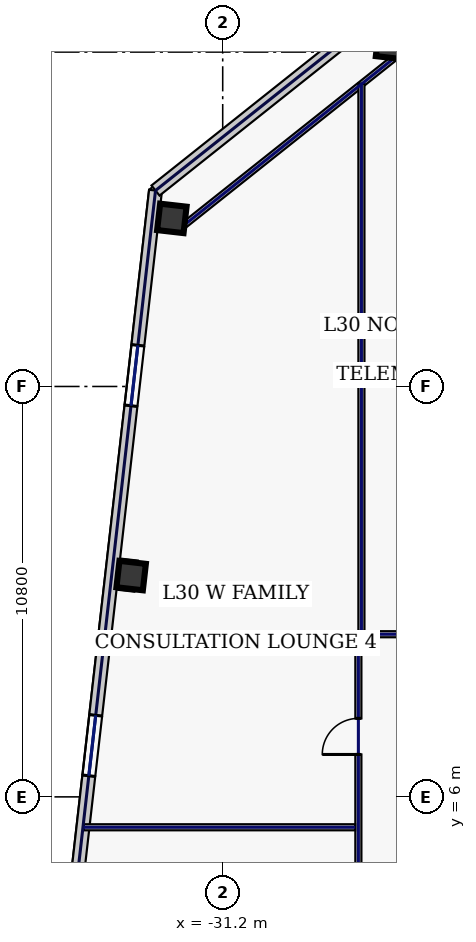
"""IFC4 building model, lengths in metres.
Left out: names, types, materials, properties, quantities, classifications, styles, units other than length and angle.
Written with IfcOpenShell. Run it as: python <this file> out.ifc"""

import sys

from ifc_helpers import new_model, si_unit, direction, frame, frame_2d, origin, origin_2d, place, context, subcontext, project, spatial, rectangle, hollow_rectangle, extrude, element, fill, save


model = new_model("IFC4")
c1 = context("Model", 3, precision=1e-05, world=origin(), true_north=direction((0.0, 1.0)))
c2 = subcontext(c1, "Body", "Model", "MODEL_VIEW")
j1 = project(units=[si_unit("LENGTHUNIT", "METRE"), si_unit("PLANEANGLEUNIT", "RADIAN")], contexts=[c1])
p1 = place(None, origin())
s1 = spatial("IfcSite", under=j1, at=p1, CompositionType="ELEMENT")
p2 = place(p1, origin())
s2 = spatial("IfcBuilding", under=s1, at=p2, CompositionType="ELEMENT")
p3 = place(p2, frame((0.0, 0.0, 133.4)))
s3 = spatial("IfcBuildingStorey", under=s2, at=p3, CompositionType="ELEMENT", Elevation=133.4)
for number, where, z_axis, x_axis in (
    (1, (-26.783, 25.801, 0.0), (0.0, 0.0, 1.0), (0.994, -0.113, 0.0)),
    (2, (-32.538, 21.223, 0.0), (0.0, 0.0, 1.0), (0.994, -0.113, 0.0)),
    (3, (-33.609, 11.824, 0.0), (0.0, 0.0, 1.0), (0.994, -0.113, 0.0)),
):
    element("IfcColumn", number, at=place(p3, frame(where, z_axis=z_axis, x_axis=x_axis)), inside=s3, PredefinedType="COLUMN", context=c2, shape_type="SweptSolid", body=[
        extrude(hollow_rectangle(XDim=0.7, YDim=0.7, WallThickness=0.032, at=origin_2d()), origin(), (0.0, 0.0, 1.0), 3.74),
    ])
p4 = place(p3, frame((-6.314, 23.982, 0.0), z_axis=(0.0, 0.0, 1.0), x_axis=(-0.993571362037, 0.113207546299, 0.0)))
e4 = element("IfcWall", 4, at=p4, inside=s3, PredefinedType="STANDARD", context=c2, shape_type="SweptSolid", body=[
    extrude(rectangle(XDim=21.223, YDim=0.34, at=frame_2d((10.611, 0.0))), origin(), (0.0, 0.0, 1.0), 3.74),
])
p5 = place(p4, frame((17.265, 0.0, 0.22)))
e5 = element("IfcOpeningElement", 5, at=p5, cuts=e4, PredefinedType="OPENING", context=c2, shape_type="SweptSolid", body=[
    extrude(rectangle(XDim=1.6, YDim=1.2, at=frame_2d((0.8, 0.6))), frame((0.0, 0.18, 0.0), z_axis=(0.0, -1.0, 0.0), x_axis=(1.0, 0.0, 0.0)), (0.0, 0.0, 1.0), 0.36),
])
p6 = place(p4, frame((12.794, 0.0, 0.67)))
e6 = element("IfcOpeningElement", 6, at=p6, cuts=e4, PredefinedType="OPENING", context=c2, shape_type="SweptSolid", body=[
    extrude(rectangle(XDim=2.1, YDim=2.2, at=frame_2d((1.05, 1.1))), frame((0.0, 0.18, 0.0), z_axis=(0.0, -1.0, 0.0), x_axis=(1.0, 0.0, 0.0)), (0.0, 0.0, 1.0), 0.36),
])
p7 = place(p4, frame((7.838, 0.0, 0.67)))
e7 = element("IfcOpeningElement", 7, at=p7, cuts=e4, PredefinedType="OPENING", context=c2, shape_type="SweptSolid", body=[
    extrude(rectangle(XDim=2.1, YDim=2.2, at=frame_2d((1.05, 1.1))), frame((0.0, 0.18, 0.0), z_axis=(0.0, -1.0, 0.0), x_axis=(1.0, 0.0, 0.0)), (0.0, 0.0, 1.0), 0.36),
])
p8 = place(p4, frame((3.616, 0.0, 0.67)))
e8 = element("IfcOpeningElement", 8, at=p8, cuts=e4, PredefinedType="OPENING", context=c2, shape_type="SweptSolid", body=[
    extrude(rectangle(XDim=0.85, YDim=1.85, at=frame_2d((0.425, 0.925))), frame((0.0, 0.18, 0.0), z_axis=(0.0, -1.0, 0.0), x_axis=(1.0, 0.0, 0.0)), (0.0, 0.0, 1.0), 0.36),
])
p9 = place(p3, frame((-32.968, 21.957, 0.0), z_axis=(0.0, 0.0, 1.0), x_axis=(-0.113201605824, -0.993572038877, 0.0)))
e9 = element("IfcWall", 9, at=p9, inside=s3, PredefinedType="STANDARD", context=c2, shape_type="SweptSolid", body=[
    extrude(rectangle(XDim=39.2, YDim=0.34, at=frame_2d((19.6, 0.0))), origin(), (0.0, 0.0, 1.0), 3.74),
])
p10 = place(p9, frame((4.1, 0.0, 0.58)))
e10 = element("IfcOpeningElement", 10, at=p10, cuts=e9, PredefinedType="OPENING", context=c2, shape_type="SweptSolid", body=[
    extrude(rectangle(XDim=1.6, YDim=2.3, at=frame_2d((0.8, 1.15))), frame((0.0, 0.18, 0.0), z_axis=(0.0, -1.0, 0.0), x_axis=(1.0, 0.0, 0.0)), (0.0, 0.0, 1.0), 0.36),
])
p11 = place(p9, frame((13.9, 0.0, 0.58)))
e11 = element("IfcOpeningElement", 11, at=p11, cuts=e9, PredefinedType="OPENING", context=c2, shape_type="SweptSolid", body=[
    extrude(rectangle(XDim=1.6, YDim=2.3, at=frame_2d((0.8, 1.15))), frame((0.0, 0.18, 0.0), z_axis=(0.0, -1.0, 0.0), x_axis=(1.0, 0.0, 0.0)), (0.0, 0.0, 1.0), 0.36),
])
p12 = place(p9, frame((23.7, 0.0, 0.58)))
e12 = element("IfcOpeningElement", 12, at=p12, cuts=e9, PredefinedType="OPENING", context=c2, shape_type="SweptSolid", body=[
    extrude(rectangle(XDim=1.6, YDim=2.3, at=frame_2d((0.8, 1.15))), frame((0.0, 0.18, 0.0), z_axis=(0.0, -1.0, 0.0), x_axis=(1.0, 0.0, 0.0)), (0.0, 0.0, 1.0), 0.36),
])
p13 = place(p9, frame((33.5, 0.0, 0.58)))
e13 = element("IfcOpeningElement", 13, at=p13, cuts=e9, PredefinedType="OPENING", context=c2, shape_type="SweptSolid", body=[
    extrude(rectangle(XDim=1.6, YDim=2.3, at=frame_2d((0.8, 1.15))), frame((0.0, 0.18, 0.0), z_axis=(0.0, -1.0, 0.0), x_axis=(1.0, 0.0, 0.0)), (0.0, 0.0, 1.0), 0.36),
])
p14 = place(p3, frame((-27.401, 26.385, 0.0), z_axis=(0.0, 0.0, 1.0), x_axis=(-0.78261359446, -0.622507800567, 0.0)))
e14 = element("IfcWall", 14, at=p14, inside=s3, PredefinedType="STANDARD", context=c2, shape_type="SweptSolid", body=[
    extrude(rectangle(XDim=7.114, YDim=0.34, at=frame_2d((3.557, 0.0))), origin(), (0.0, 0.0, 1.0), 3.74),
])
p15 = place(p3, frame((-26.571, 25.535, 0.0), z_axis=(0.0, 0.0, 1.0), x_axis=(-0.782617962887, -0.622502308564, 0.0)))
e15 = element("IfcWall", 15, at=p15, inside=s3, PredefinedType="PARTITIONING", context=c2, shape_type="SweptSolid", body=[
    extrude(rectangle(XDim=7.354, YDim=0.16, at=frame_2d((3.677, 0.0))), origin(), (0.0, 0.0, 1.0), 3.74),
])
p16 = place(p3, frame((-27.63, -10.015, 0.0), z_axis=(0.0, 0.0, 1.0), x_axis=(0.0, 1.0, 0.0)))
e16 = element("IfcWall", 16, at=p16, inside=s3, PredefinedType="PARTITIONING", context=c2, shape_type="SweptSolid", body=[
    extrude(rectangle(XDim=20.13, YDim=0.16, at=frame_2d((10.065, 0.0))), origin(), (0.0, 0.0, 1.0), 3.74),
])
p17 = place(p16, frame((2.169, 0.0, 0.0)))
e17 = element("IfcOpeningElement", 17, at=p17, cuts=e16, PredefinedType="OPENING", context=c2, shape_type="SweptSolid", body=[
    extrude(rectangle(XDim=0.95, YDim=2.2, at=frame_2d((0.475, 1.1))), frame((0.0, 0.09, 0.0), z_axis=(0.0, -1.0, 0.0), x_axis=(1.0, 0.0, 0.0)), (0.0, 0.0, 1.0), 0.18),
])
p18 = place(p16, frame((7.025, 0.0, 0.0)))
e18 = element("IfcOpeningElement", 18, at=p18, cuts=e16, PredefinedType="OPENING", context=c2, shape_type="SweptSolid", body=[
    extrude(rectangle(XDim=0.95, YDim=2.2, at=frame_2d((0.475, 1.1))), frame((0.0, 0.09, 0.0), z_axis=(0.0, -1.0, 0.0), x_axis=(1.0, 0.0, 0.0)), (0.0, 0.0, 1.0), 0.18),
])
p19 = place(p16, frame((12.225, 0.0, 0.0)))
e19 = element("IfcOpeningElement", 19, at=p19, cuts=e16, PredefinedType="OPENING", context=c2, shape_type="SweptSolid", body=[
    extrude(rectangle(XDim=0.95, YDim=2.2, at=frame_2d((0.475, 1.1))), frame((0.0, 0.09, 0.0), z_axis=(0.0, -1.0, 0.0), x_axis=(1.0, 0.0, 0.0)), (0.0, 0.0, 1.0), 0.18),
])
p20 = place(p16, frame((17.131, 0.0, 0.0)))
e20 = element("IfcOpeningElement", 20, at=p20, cuts=e16, PredefinedType="OPENING", context=c2, shape_type="SweptSolid", body=[
    extrude(rectangle(XDim=0.95, YDim=2.2, at=frame_2d((0.475, 1.1))), frame((0.0, 0.09, 0.0), z_axis=(0.0, -1.0, 0.0), x_axis=(1.0, 0.0, 0.0)), (0.0, 0.0, 1.0), 0.18),
])
p21 = place(p3, frame((-27.465, 10.28, 0.0), z_axis=(0.0, 0.0, 1.0), x_axis=(1.0, 0.0, 0.0)))
e21 = element("IfcWall", 21, at=p21, inside=s3, PredefinedType="PARTITIONING", context=c2, shape_type="SweptSolid", body=[
    extrude(rectangle(XDim=54.93, YDim=0.16, at=frame_2d((27.465, 0.0))), origin(), (0.0, 0.0, 1.0), 3.74),
])
p22 = place(p21, frame((1.869, 0.0, 0.0)))
e22 = element("IfcOpeningElement", 22, at=p22, cuts=e21, PredefinedType="OPENING", context=c2, shape_type="SweptSolid", body=[
    extrude(rectangle(XDim=1.3, YDim=2.2, at=frame_2d((0.65, 1.1))), frame((0.0, 0.09, 0.0), z_axis=(0.0, -1.0, 0.0), x_axis=(1.0, 0.0, 0.0)), (0.0, 0.0, 1.0), 0.18),
])
p23 = place(p21, frame((7.1, 0.0, 0.0)))
e23 = element("IfcOpeningElement", 23, at=p23, cuts=e21, PredefinedType="OPENING", context=c2, shape_type="SweptSolid", body=[
    extrude(rectangle(XDim=0.95, YDim=2.2, at=frame_2d((0.475, 1.1))), frame((0.0, 0.09, 0.0), z_axis=(0.0, -1.0, 0.0), x_axis=(1.0, 0.0, 0.0)), (0.0, 0.0, 1.0), 0.18),
])
p24 = place(p21, frame((12.5, 0.0, 0.0)))
e24 = element("IfcOpeningElement", 24, at=p24, cuts=e21, PredefinedType="OPENING", context=c2, shape_type="SweptSolid", body=[
    extrude(rectangle(XDim=0.95, YDim=2.2, at=frame_2d((0.475, 1.1))), frame((0.0, 0.09, 0.0), z_axis=(0.0, -1.0, 0.0), x_axis=(1.0, 0.0, 0.0)), (0.0, 0.0, 1.0), 0.18),
])
p25 = place(p21, frame((18.325, 0.0, 0.0)))
e25 = element("IfcOpeningElement", 25, at=p25, cuts=e21, PredefinedType="OPENING", context=c2, shape_type="SweptSolid", body=[
    extrude(rectangle(XDim=0.95, YDim=2.2, at=frame_2d((0.475, 1.1))), frame((0.0, 0.09, 0.0), z_axis=(0.0, -1.0, 0.0), x_axis=(1.0, 0.0, 0.0)), (0.0, 0.0, 1.0), 0.18),
])
p26 = place(p21, frame((24.575, 0.0, 0.0)))
e26 = element("IfcOpeningElement", 26, at=p26, cuts=e21, PredefinedType="OPENING", context=c2, shape_type="SweptSolid", body=[
    extrude(rectangle(XDim=0.95, YDim=2.2, at=frame_2d((0.475, 1.1))), frame((0.0, 0.09, 0.0), z_axis=(0.0, -1.0, 0.0), x_axis=(1.0, 0.0, 0.0)), (0.0, 0.0, 1.0), 0.18),
])
p27 = place(p21, frame((30.69, 0.0, 0.0)))
e27 = element("IfcOpeningElement", 27, at=p27, cuts=e21, PredefinedType="OPENING", context=c2, shape_type="SweptSolid", body=[
    extrude(rectangle(XDim=1.3, YDim=2.2, at=frame_2d((0.65, 1.1))), frame((0.0, 0.09, 0.0), z_axis=(0.0, -1.0, 0.0), x_axis=(1.0, 0.0, 0.0)), (0.0, 0.0, 1.0), 0.18),
])
p28 = place(p21, frame((37.02, 0.0, 0.0)))
e28 = element("IfcOpeningElement", 28, at=p28, cuts=e21, PredefinedType="OPENING", context=c2, shape_type="SweptSolid", body=[
    extrude(rectangle(XDim=1.3, YDim=2.2, at=frame_2d((0.65, 1.1))), frame((0.0, 0.09, 0.0), z_axis=(0.0, -1.0, 0.0), x_axis=(1.0, 0.0, 0.0)), (0.0, 0.0, 1.0), 0.18),
])
p29 = place(p21, frame((44.73, 0.0, 0.0)))
e29 = element("IfcOpeningElement", 29, at=p29, cuts=e21, PredefinedType="OPENING", context=c2, shape_type="SweptSolid", body=[
    extrude(rectangle(XDim=1.3, YDim=2.2, at=frame_2d((0.65, 1.1))), frame((0.0, 0.09, 0.0), z_axis=(0.0, -1.0, 0.0), x_axis=(1.0, 0.0, 0.0)), (0.0, 0.0, 1.0), 0.18),
])
p30 = place(p21, frame((51.956, 0.0, 0.0)))
e30 = element("IfcOpeningElement", 30, at=p30, cuts=e21, PredefinedType="OPENING", context=c2, shape_type="SweptSolid", body=[
    extrude(rectangle(XDim=0.95, YDim=2.2, at=frame_2d((0.475, 1.1))), frame((0.0, 0.09, 0.0), z_axis=(0.0, -1.0, 0.0), x_axis=(1.0, 0.0, 0.0)), (0.0, 0.0, 1.0), 0.18),
])
p31 = place(p3, frame((-27.55, 10.365, 0.0), z_axis=(0.0, 0.0, 1.0), x_axis=(0.0, 1.0, 0.0)))
e31 = element("IfcWall", 31, at=p31, inside=s3, PredefinedType="PARTITIONING", context=c2, shape_type="SweptSolid", body=[
    extrude(rectangle(XDim=14.409, YDim=0.16, at=frame_2d((7.204, 0.0))), origin(), (0.0, 0.0, 1.0), 3.74),
])
p32 = place(p3, frame((-34.857, 5.2, 0.0), z_axis=(0.0, 0.0, 1.0), x_axis=(1.0, 0.0, 0.0)))
e32 = element("IfcWall", 32, at=p32, inside=s3, PredefinedType="PARTITIONING", context=c2, shape_type="SweptSolid", body=[
    extrude(rectangle(XDim=7.142, YDim=0.16, at=frame_2d((3.571, 0.0))), origin(), (0.0, 0.0, 1.0), 3.74),
])
p33 = place(p10, origin())
e33 = element("IfcWindow", 33, at=p33, inside=s3, PartitioningType="SINGLE_PANEL", PredefinedType="WINDOW", context=c2, shape_type="SweptSolid", body=[
    extrude(rectangle(XDim=1.6, YDim=2.3, at=frame_2d((0.8, 1.15))), frame((0.0, 0.03, 0.0), z_axis=(0.0, -1.0, 0.0), x_axis=(1.0, 0.0, 0.0)), (0.0, 0.0, 1.0), 0.06),
])
fill(e10, e33)
p34 = place(p11, origin())
e34 = element("IfcWindow", 34, at=p34, inside=s3, PartitioningType="SINGLE_PANEL", PredefinedType="WINDOW", context=c2, shape_type="SweptSolid", body=[
    extrude(rectangle(XDim=1.6, YDim=2.3, at=frame_2d((0.8, 1.15))), frame((0.0, 0.03, 0.0), z_axis=(0.0, -1.0, 0.0), x_axis=(1.0, 0.0, 0.0)), (0.0, 0.0, 1.0), 0.06),
])
fill(e11, e34)
p35 = place(p20, origin())
e35 = element("IfcDoor", 35, at=p35, inside=s3, OperationType="SINGLE_SWING_LEFT", PredefinedType="DOOR", context=c2, shape_type="SweptSolid", body=[
    extrude(rectangle(XDim=0.95, YDim=2.2, at=frame_2d((0.475, 1.1))), frame((0.0, 0.025, 0.0), z_axis=(0.0, -1.0, 0.0), x_axis=(1.0, 0.0, 0.0)), (0.0, 0.0, 1.0), 0.05),
])
fill(e20, e35)
save(model, sys.argv[1])
